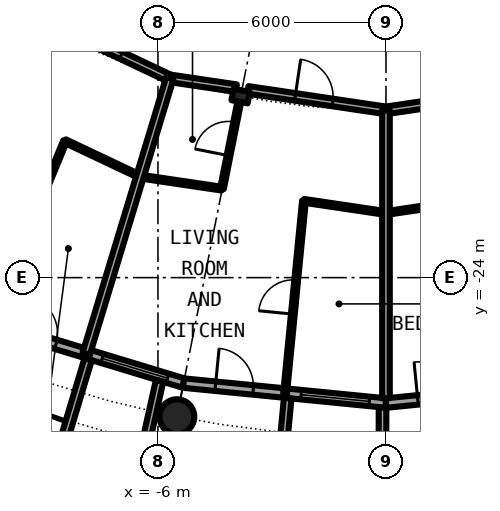
"""IFC4 building model, lengths in metres.
Left out: names, types, materials, properties, quantities, classifications, styles, units other than length and angle.
Written with IfcOpenShell. Run it as: python <this file> out.ifc"""

import sys

from ifc_helpers import new_model, si_unit, direction, frame, frame_2d, origin, origin_2d, place, context, subcontext, project, spatial, rectangle, hollow_circle, i_section, extrude, element, fill, save


model = new_model("IFC4")
c1 = context("Model", 3, precision=1e-05, world=origin(), true_north=direction((0.0, 1.0)))
c2 = subcontext(c1, "Body", "Model", "MODEL_VIEW")
j1 = project(units=[si_unit("LENGTHUNIT", "METRE"), si_unit("PLANEANGLEUNIT", "RADIAN")], contexts=[c1])
p1 = place(None, origin())
s1 = spatial("IfcSite", under=j1, at=p1, CompositionType="ELEMENT")
p2 = place(p1, origin())
s2 = spatial("IfcBuilding", under=s1, at=p2, CompositionType="ELEMENT")
p3 = place(p2, frame((0.0, 0.0, 123.85)))
s3 = spatial("IfcBuildingStorey", under=s2, at=p3, CompositionType="ELEMENT", Elevation=123.85)
p4 = place(p3, frame((-5.501, -27.658, 0.0), z_axis=(0.0, 0.0, 1.0), x_axis=(1.0, 0.0, 0.0)))
e1 = element("IfcColumn", 1, at=p4, inside=s3, PredefinedType="COLUMN", context=c2, shape_type="SweptSolid", body=[
    extrude(hollow_circle(Radius=0.457, WallThickness=0.04, at=origin_2d()), origin(), (0.0, 0.0, 1.0), 3.05),
])
p5 = place(p3, frame((-3.824, -19.223, 0.0), z_axis=(0.0, 0.0, 1.0), x_axis=(-0.195090322016, -0.980785280403, 0.0)))
e2 = element("IfcColumn", 2, at=p5, inside=s3, PredefinedType="COLUMN", context=c2, shape_type="SweptSolid", body=[
    extrude(i_section(OverallWidth=0.307, OverallDepth=0.432, WebThickness=0.021, FlangeThickness=0.04, FilletRadius=0.027, at=origin_2d()), origin(), (0.0, 0.0, 1.0), 3.05),
])
p6 = place(p3, frame((-10.447, -25.222, 0.0), z_axis=(0.0, 0.0, 1.0), x_axis=(0.956965678721, -0.290201119486, 0.0)))
e3 = element("IfcWall", 3, at=p6, inside=s3, PredefinedType="SOLIDWALL", context=c2, shape_type="SweptSolid", body=[
    extrude(rectangle(XDim=5.351, YDim=0.25, at=frame_2d((2.676, 0.0))), origin(), (0.0, 0.0, 1.0), 2.7),
])
p7 = place(p6, frame((0.841, 0.0, 0.0)))
e4 = element("IfcOpeningElement", 4, at=p7, cuts=e3, PredefinedType="OPENING", context=c2, shape_type="SweptSolid", body=[
    extrude(rectangle(XDim=1.0, YDim=2.2, at=frame_2d((0.5, 1.1))), frame((0.0, 0.135, 0.0), z_axis=(0.0, -1.0, 0.0), x_axis=(1.0, 0.0, 0.0)), (0.0, 0.0, 1.0), 0.27),
])
p8 = place(p6, frame((3.111, 0.0, 0.3)))
e5 = element("IfcOpeningElement", 5, at=p8, cuts=e3, PredefinedType="OPENING", context=c2, shape_type="SweptSolid", body=[
    extrude(rectangle(XDim=1.8, YDim=2.1, at=frame_2d((0.9, 1.05))), frame((0.0, 0.135, 0.0), z_axis=(0.0, -1.0, 0.0), x_axis=(1.0, 0.0, 0.0)), (0.0, 0.0, 1.0), 0.27),
])
p9 = place(p3, frame((-7.837, -26.144, -0.03), z_axis=(0.0, 0.0, 1.0), x_axis=(-0.287064767992, -0.957911174889, 0.0)))
e6 = element("IfcWall", 6, at=p9, inside=s3, PredefinedType="SOLIDWALL", context=c2, shape_type="SweptSolid", body=[
    extrude(rectangle(XDim=3.006, YDim=0.2, at=frame_2d((1.503, 0.0))), origin(), (0.0, 0.0, 1.0), 2.73),
])
p10 = place(p3, frame((-5.957, -26.715, -0.03), z_axis=(0.0, 0.0, 1.0), x_axis=(-0.217857287091, -0.975980636315, 0.0)))
e7 = element("IfcWall", 7, at=p10, inside=s3, PredefinedType="SOLIDWALL", context=c2, shape_type="SweptSolid", body=[
    extrude(rectangle(XDim=2.928, YDim=0.2, at=frame_2d((1.464, 0.0))), origin(), (0.0, 0.0, 1.0), 2.73),
])
p11 = place(p3, frame((-5.326, -26.775, 0.0), z_axis=(0.0, 0.0, 1.0), x_axis=(0.995173996315, -0.098126026407, 0.0)))
e8 = element("IfcWall", 8, at=p11, inside=s3, PredefinedType="SOLIDWALL", context=c2, shape_type="SweptSolid", body=[
    extrude(rectangle(XDim=5.352, YDim=0.25, at=frame_2d((2.676, 0.0))), origin(), (0.0, 0.0, 1.0), 2.7),
])
p12 = place(p11, frame((0.841, 0.0, 0.0)))
e9 = element("IfcOpeningElement", 9, at=p12, cuts=e8, PredefinedType="OPENING", context=c2, shape_type="SweptSolid", body=[
    extrude(rectangle(XDim=1.0, YDim=2.2, at=frame_2d((0.5, 1.1))), frame((0.0, 0.135, 0.0), z_axis=(0.0, -1.0, 0.0), x_axis=(1.0, 0.0, 0.0)), (0.0, 0.0, 1.0), 0.27),
])
p13 = place(p11, frame((3.111, 0.0, 0.3)))
e10 = element("IfcOpeningElement", 10, at=p13, cuts=e8, PredefinedType="OPENING", context=c2, shape_type="SweptSolid", body=[
    extrude(rectangle(XDim=1.8, YDim=2.1, at=frame_2d((0.9, 1.05))), frame((0.0, 0.135, 0.0), z_axis=(0.0, -1.0, 0.0), x_axis=(1.0, 0.0, 0.0)), (0.0, 0.0, 1.0), 0.27),
])
p14 = place(p3, frame((-2.586, -27.171, -0.03), z_axis=(0.0, 0.0, 1.0), x_axis=(-0.094548432284, -0.995520262954, 0.0)))
e11 = element("IfcWall", 11, at=p14, inside=s3, PredefinedType="SOLIDWALL", context=c2, shape_type="SweptSolid", body=[
    extrude(rectangle(XDim=3.006, YDim=0.2, at=frame_2d((1.503, 0.0))), origin(), (0.0, 0.0, 1.0), 2.73),
])
p15 = place(p3, frame((-0.09, -27.417, -0.03), z_axis=(0.0, 0.0, 1.0), x_axis=(-0.00347308367, -0.999993968827, 0.0)))
e12 = element("IfcWall", 12, at=p15, inside=s3, PredefinedType="SOLIDWALL", context=c2, shape_type="SweptSolid", body=[
    extrude(rectangle(XDim=2.882, YDim=0.2, at=frame_2d((1.441, 0.0))), origin(), (0.0, 0.0, 1.0), 2.73),
])
p16 = place(p3, frame((0.0, -27.3, 0.0), z_axis=(0.0, 0.0, 1.0), x_axis=(0.995173996315, 0.098126026407, 0.0)))
e13 = element("IfcWall", 13, at=p16, inside=s3, PredefinedType="SOLIDWALL", context=c2, shape_type="SweptSolid", body=[
    extrude(rectangle(XDim=5.352, YDim=0.25, at=frame_2d((2.676, 0.0))), origin(), (0.0, 0.0, 1.0), 2.7),
])
p17 = place(p16, frame((0.841, 0.0, 0.0)))
e14 = element("IfcOpeningElement", 14, at=p17, cuts=e13, PredefinedType="OPENING", context=c2, shape_type="SweptSolid", body=[
    extrude(rectangle(XDim=1.0, YDim=2.2, at=frame_2d((0.5, 1.1))), frame((0.0, 0.135, 0.0), z_axis=(0.0, -1.0, 0.0), x_axis=(1.0, 0.0, 0.0)), (0.0, 0.0, 1.0), 0.27),
])
p18 = place(p16, frame((3.111, 0.0, 0.3)))
e15 = element("IfcOpeningElement", 15, at=p18, cuts=e13, PredefinedType="OPENING", context=c2, shape_type="SweptSolid", body=[
    extrude(rectangle(XDim=1.8, YDim=2.1, at=frame_2d((0.9, 1.05))), frame((0.0, 0.135, 0.0), z_axis=(0.0, -1.0, 0.0), x_axis=(1.0, 0.0, 0.0)), (0.0, 0.0, 1.0), 0.27),
])
p19 = place(p3, frame((-8.445, -20.407, 0.0), z_axis=(0.0, 0.0, 1.0), x_axis=(0.903929143338, -0.427682246328, 0.0)))
e16 = element("IfcWall", 16, at=p19, inside=s3, PredefinedType="PARTITIONING", context=c2, shape_type="SweptSolid", body=[
    extrude(rectangle(XDim=2.182, YDim=0.1, at=frame_2d((1.091, 0.0))), origin(), (0.0, 0.0, 1.0), 2.7),
])
for number, where, z_axis, x_axis in (
    (17, (-6.473, -21.34, 0.0), (0.0, 0.0, 1.0), (0.989, -0.147, 0.0)),
    (18, (-2.159, -21.98, 0.0), (0.0, 0.0, 1.0), (0.989, -0.147, 0.0)),
    (19, (0.002, -22.3, 0.0), (0.0, 0.0, 1.0), (0.989, 0.147, 0.0)),
):
    element("IfcWall", number, at=place(p3, frame(where, z_axis=z_axis, x_axis=x_axis)), inside=s3, PredefinedType="PARTITIONING", context=c2, shape_type="SweptSolid", body=[
        extrude(rectangle(XDim=2.181, YDim=0.1, at=frame_2d((1.09, 0.0))), origin(), (0.0, 0.0, 1.0), 2.7),
    ])
p20 = place(p3, frame((-10.749, -16.363, 0.0), z_axis=(0.0, 0.0, 1.0), x_axis=(0.903968655954, -0.427598724335, 0.0)))
e20 = element("IfcWall", 20, at=p20, inside=s3, PredefinedType="PARTITIONING", context=c2, shape_type="SweptSolid", body=[
    extrude(rectangle(XDim=5.596, YDim=0.2, at=frame_2d((2.798, 0.0))), origin(), (0.0, 0.0, 1.0), 2.39),
])
p21 = place(p20, frame((3.179, 0.0, 0.0)))
e21 = element("IfcOpeningElement", 21, at=p21, cuts=e20, PredefinedType="OPENING", context=c2, shape_type="SweptSolid", body=[
    extrude(rectangle(XDim=1.0, YDim=2.3, at=frame_2d((0.5, 1.15))), frame((0.0, 0.11, 0.0), z_axis=(0.0, -1.0, 0.0), x_axis=(1.0, 0.0, 0.0)), (0.0, 0.0, 1.0), 0.22),
])
p22 = place(p3, frame((-5.696, -18.755, 0.0), z_axis=(0.0, 0.0, 1.0), x_axis=(0.989227802256, -0.146384272531, 0.0)))
e22 = element("IfcWall", 22, at=p22, inside=s3, PredefinedType="PARTITIONING", context=c2, shape_type="SweptSolid", body=[
    extrude(rectangle(XDim=1.776, YDim=0.2, at=frame_2d((0.888, 0.0))), origin(), (0.0, 0.0, 1.0), 2.39),
])
p23 = place(p3, frame((-3.635, -19.06, 0.0), z_axis=(0.0, 0.0, 1.0), x_axis=(0.989143454832, -0.146953141385, 0.0)))
e23 = element("IfcWall", 23, at=p23, inside=s3, PredefinedType="PARTITIONING", context=c2, shape_type="SweptSolid", body=[
    extrude(rectangle(XDim=3.675, YDim=0.2, at=frame_2d((1.837, 0.0))), origin(), (0.0, 0.0, 1.0), 2.39),
])
p24 = place(p23, frame((1.258, 0.0, 0.0)))
e24 = element("IfcOpeningElement", 24, at=p24, cuts=e23, PredefinedType="OPENING", context=c2, shape_type="SweptSolid", body=[
    extrude(rectangle(XDim=1.0, YDim=2.3, at=frame_2d((0.5, 1.15))), frame((0.0, 0.11, 0.0), z_axis=(0.0, -1.0, 0.0), x_axis=(1.0, 0.0, 0.0)), (0.0, 0.0, 1.0), 0.22),
])
p25 = place(p3, frame((0.0, -19.6, 0.0), z_axis=(0.0, 0.0, 1.0), x_axis=(0.989143454832, 0.146953141385, 0.0)))
e25 = element("IfcWall", 25, at=p25, inside=s3, PredefinedType="PARTITIONING", context=c2, shape_type="SweptSolid", body=[
    extrude(rectangle(XDim=3.675, YDim=0.2, at=frame_2d((1.837, 0.0))), origin(), (0.0, 0.0, 1.0), 2.39),
])
p26 = place(p25, frame((1.417, 0.0, 0.0)))
e26 = element("IfcOpeningElement", 26, at=p26, cuts=e25, PredefinedType="OPENING", context=c2, shape_type="SweptSolid", body=[
    extrude(rectangle(XDim=1.0, YDim=2.3, at=frame_2d((0.5, 1.15))), frame((0.0, 0.11, 0.0), z_axis=(0.0, -1.0, 0.0), x_axis=(1.0, 0.0, 0.0)), (0.0, 0.0, 1.0), 0.22),
])
p27 = place(p3, frame((-10.391, -25.11, 0.0), z_axis=(0.0, 0.0, 1.0), x_axis=(0.382339082848, 0.92402209158, 0.0)))
e27 = element("IfcWall", 27, at=p27, inside=s3, PredefinedType="PARTITIONING", context=c2, shape_type="SweptSolid", body=[
    extrude(rectangle(XDim=5.09, YDim=0.1, at=frame_2d((2.545, 0.0))), origin(), (0.0, 0.0, 1.0), 2.7),
])
p28 = place(p27, frame((2.095, 0.0, 0.0)))
e28 = element("IfcOpeningElement", 28, at=p28, cuts=e27, PredefinedType="OPENING", context=c2, shape_type="SweptSolid", body=[
    extrude(rectangle(XDim=0.9, YDim=2.3, at=frame_2d((0.45, 1.15))), frame((0.0, 0.06, 0.0), z_axis=(0.0, -1.0, 0.0), x_axis=(1.0, 0.0, 0.0)), (0.0, 0.0, 1.0), 0.12),
])
p29 = place(p3, frame((-7.888, -26.005, 0.0), z_axis=(0.0, 0.0, 1.0), x_axis=(0.290294523619, 0.956937348815, 0.0)))
e29 = element("IfcWall", 29, at=p29, inside=s3, PredefinedType="PARTITIONING", context=c2, shape_type="SweptSolid", body=[
    extrude(rectangle(XDim=7.575, YDim=0.2, at=frame_2d((3.788, 0.0))), origin(), (0.0, 0.0, 1.0), 2.7),
])
p30 = place(p3, frame((-4.316, -21.66, 0.0), z_axis=(0.0, 0.0, 1.0), x_axis=(0.195557580153, 0.980692221262, 0.0)))
e30 = element("IfcWall", 30, at=p30, inside=s3, PredefinedType="PARTITIONING", context=c2, shape_type="SweptSolid", body=[
    extrude(rectangle(XDim=2.27, YDim=0.1, at=frame_2d((1.135, 0.0))), origin(), (0.0, 0.0, 1.0), 2.7),
])
p31 = place(p30, frame((0.887, 0.0, 0.0)))
e31 = element("IfcOpeningElement", 31, at=p31, cuts=e30, PredefinedType="OPENING", context=c2, shape_type="SweptSolid", body=[
    extrude(rectangle(XDim=0.9, YDim=2.3, at=frame_2d((0.45, 1.15))), frame((0.0, 0.06, 0.0), z_axis=(0.0, -1.0, 0.0), x_axis=(1.0, 0.0, 0.0)), (0.0, 0.0, 1.0), 0.12),
])
p32 = place(p3, frame((-2.655, -27.045, 0.0), z_axis=(0.0, 0.0, 1.0), x_axis=(0.097670180016, 0.995218838214, 0.0)))
e32 = element("IfcWall", 32, at=p32, inside=s3, PredefinedType="PARTITIONING", context=c2, shape_type="SweptSolid", body=[
    extrude(rectangle(XDim=5.089, YDim=0.1, at=frame_2d((2.545, 0.0))), origin(), (0.0, 0.0, 1.0), 2.7),
])
p33 = place(p32, frame((2.095, 0.0, 0.0)))
e33 = element("IfcOpeningElement", 33, at=p33, cuts=e32, PredefinedType="OPENING", context=c2, shape_type="SweptSolid", body=[
    extrude(rectangle(XDim=0.9, YDim=2.3, at=frame_2d((0.45, 1.15))), frame((0.0, 0.06, 0.0), z_axis=(0.0, -1.0, 0.0), x_axis=(1.0, 0.0, 0.0)), (0.0, 0.0, 1.0), 0.12),
])
p34 = place(p3, frame((0.0, -27.175, 0.0), z_axis=(0.0, 0.0, 1.0), x_axis=(0.0, 1.0, 0.0)))
e34 = element("IfcWall", 34, at=p34, inside=s3, PredefinedType="PARTITIONING", context=c2, shape_type="SweptSolid", body=[
    extrude(rectangle(XDim=7.575, YDim=0.2, at=frame_2d((3.788, 0.0))), origin(), (0.0, 0.0, 1.0), 2.7),
])
p35 = place(p7, origin())
e35 = element("IfcDoor", 35, at=p35, inside=s3, OperationType="SINGLE_SWING_LEFT", PredefinedType="DOOR", context=c2, shape_type="SweptSolid", body=[
    extrude(rectangle(XDim=1.0, YDim=2.2, at=frame_2d((0.5, 1.1))), frame((0.0, 0.025, 0.0), z_axis=(0.0, -1.0, 0.0), x_axis=(1.0, 0.0, 0.0)), (0.0, 0.0, 1.0), 0.05),
])
fill(e4, e35)
p36 = place(p8, origin())
e36 = element("IfcWindow", 36, at=p36, inside=s3, PartitioningType="SINGLE_PANEL", PredefinedType="WINDOW", context=c2, shape_type="SweptSolid", body=[
    extrude(rectangle(XDim=1.8, YDim=2.1, at=frame_2d((0.9, 1.05))), frame((0.0, 0.03, 0.0), z_axis=(0.0, -1.0, 0.0), x_axis=(1.0, 0.0, 0.0)), (0.0, 0.0, 1.0), 0.06),
])
fill(e5, e36)
p37 = place(p12, origin())
e37 = element("IfcDoor", 37, at=p37, inside=s3, OperationType="SINGLE_SWING_LEFT", PredefinedType="DOOR", context=c2, shape_type="SweptSolid", body=[
    extrude(rectangle(XDim=1.0, YDim=2.2, at=frame_2d((0.5, 1.1))), frame((0.0, 0.025, 0.0), z_axis=(0.0, -1.0, 0.0), x_axis=(1.0, 0.0, 0.0)), (0.0, 0.0, 1.0), 0.05),
])
fill(e9, e37)
p38 = place(p13, origin())
e38 = element("IfcWindow", 38, at=p38, inside=s3, PartitioningType="SINGLE_PANEL", PredefinedType="WINDOW", context=c2, shape_type="SweptSolid", body=[
    extrude(rectangle(XDim=1.8, YDim=2.1, at=frame_2d((0.9, 1.05))), frame((0.0, 0.03, 0.0), z_axis=(0.0, -1.0, 0.0), x_axis=(1.0, 0.0, 0.0)), (0.0, 0.0, 1.0), 0.06),
])
fill(e10, e38)
p39 = place(p17, origin())
e39 = element("IfcDoor", 39, at=p39, inside=s3, OperationType="SINGLE_SWING_LEFT", PredefinedType="DOOR", context=c2, shape_type="SweptSolid", body=[
    extrude(rectangle(XDim=1.0, YDim=2.2, at=frame_2d((0.5, 1.1))), frame((0.0, 0.025, 0.0), z_axis=(0.0, -1.0, 0.0), x_axis=(1.0, 0.0, 0.0)), (0.0, 0.0, 1.0), 0.05),
])
fill(e14, e39)
p40 = place(p21, origin())
e40 = element("IfcDoor", 40, at=p40, inside=s3, OperationType="SINGLE_SWING_RIGHT", PredefinedType="DOOR", context=c2, shape_type="SweptSolid", body=[
    extrude(rectangle(XDim=1.0, YDim=2.3, at=frame_2d((0.5, 1.15))), frame((0.0, 0.025, 0.0), z_axis=(0.0, -1.0, 0.0), x_axis=(1.0, 0.0, 0.0)), (0.0, 0.0, 1.0), 0.05),
])
fill(e21, e40)
p41 = place(p24, origin())
e41 = element("IfcDoor", 41, at=p41, inside=s3, OperationType="SINGLE_SWING_LEFT", PredefinedType="DOOR", context=c2, shape_type="SweptSolid", body=[
    extrude(rectangle(XDim=1.0, YDim=2.3, at=frame_2d((0.5, 1.15))), frame((0.0, 0.025, 0.0), z_axis=(0.0, -1.0, 0.0), x_axis=(1.0, 0.0, 0.0)), (0.0, 0.0, 1.0), 0.05),
])
fill(e24, e41)
p42 = place(p31, origin())
e42 = element("IfcDoor", 42, at=p42, inside=s3, OperationType="SINGLE_SWING_RIGHT", PredefinedType="DOOR", context=c2, shape_type="SweptSolid", body=[
    extrude(rectangle(XDim=0.9, YDim=2.3, at=frame_2d((0.45, 1.15))), frame((0.0, 0.025, 0.0), z_axis=(0.0, -1.0, 0.0), x_axis=(1.0, 0.0, 0.0)), (0.0, 0.0, 1.0), 0.05),
])
fill(e31, e42)
p43 = place(p33, origin())
e43 = element("IfcDoor", 43, at=p43, inside=s3, OperationType="SINGLE_SWING_RIGHT", PredefinedType="DOOR", context=c2, shape_type="SweptSolid", body=[
    extrude(rectangle(XDim=0.9, YDim=2.3, at=frame_2d((0.45, 1.15))), frame((0.0, 0.025, 0.0), z_axis=(0.0, -1.0, 0.0), x_axis=(1.0, 0.0, 0.0)), (0.0, 0.0, 1.0), 0.05),
])
fill(e33, e43)
save(model, sys.argv[1])
